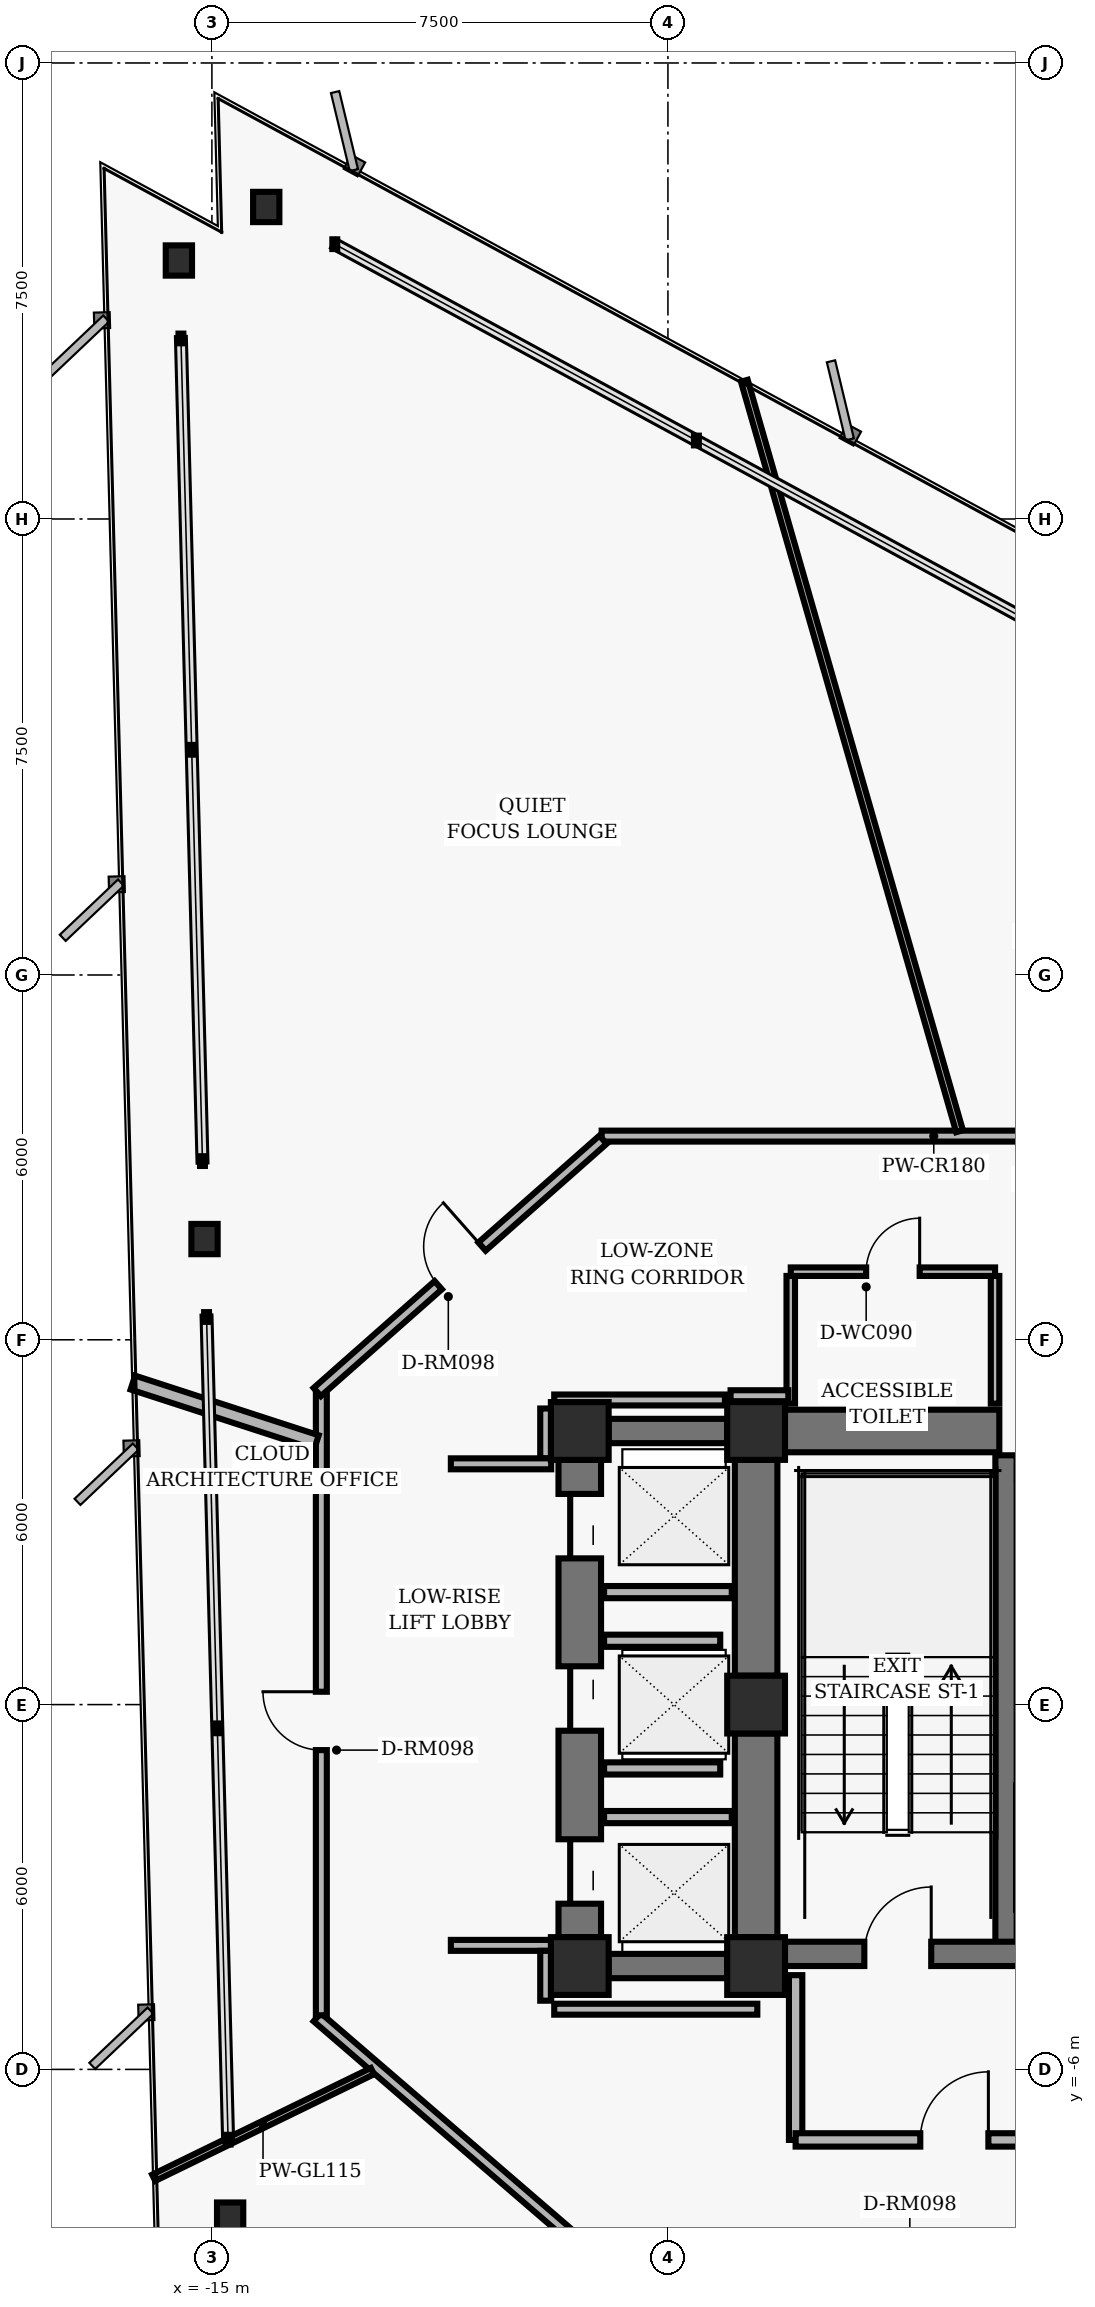
"""IFC4 building model, lengths in metres.
Left out: names, types, materials, properties, quantities, classifications, styles, units other than length and angle.
Written with IfcOpenShell. Run it as: python <this file> out.ifc"""

import sys

from ifc_helpers import new_model, si_unit, direction, frame, frame_2d, origin, origin_2d, place, context, subcontext, project, spatial, rectangle, hollow_rectangle, i_section, extrude, element, fill, save


model = new_model("IFC4")
c1 = context("Model", 3, precision=1e-05, world=origin(), true_north=direction((0.0, 1.0)))
c2 = subcontext(c1, "Body", "Model", "MODEL_VIEW")
j1 = project(units=[si_unit("LENGTHUNIT", "METRE"), si_unit("PLANEANGLEUNIT", "RADIAN")], contexts=[c1])
p1 = place(None, origin())
s1 = spatial("IfcSite", under=j1, at=p1, CompositionType="ELEMENT")
p2 = place(p1, origin())
s2 = spatial("IfcBuilding", under=s1, at=p2, CompositionType="ELEMENT")
p3 = place(p2, frame((0.0, 0.0, 22.24)))
s3 = spatial("IfcBuildingStorey", under=s2, at=p3, CompositionType="ELEMENT", Elevation=22.24)
for number, where, z_axis, x_axis in (
    (1, (-6.05, 4.5, 0.0), (0.0, 0.0, 1.0), (1.0, 0.0, 0.0)),
    (2, (-6.05, 0.0, 0.0), (0.0, 0.0, 1.0), (1.0, 0.0, 0.0)),
    (3, (-6.05, -4.3, 0.0), (0.0, 0.0, 1.0), (1.0, 0.0, 0.0)),
    (4, (-8.95, 4.5, 0.0), (0.0, 0.0, 1.0), (1.0, 0.0, 0.0)),
    (5, (-8.95, -4.3, 0.0), (0.0, 0.0, 1.0), (1.0, 0.0, 0.0)),
):
    element("IfcColumn", number, at=place(p3, frame(where, z_axis=z_axis, x_axis=x_axis)), inside=s3, PredefinedType="COLUMN", context=c2, shape_type="SweptSolid", body=[
        extrude(hollow_rectangle(XDim=0.95, YDim=0.95, WallThickness=0.06, InnerFilletRadius=0.02, OuterFilletRadius=0.04, at=origin_2d()), origin(), (0.0, 0.0, 1.0), 3.36),
    ])
p4 = place(p3, frame((-6.05, 0.475, 0.0), z_axis=(0.0, 0.0, 1.0), x_axis=(0.0, 1.0, 0.0)))
e6 = element("IfcWall", 6, at=p4, inside=s3, PredefinedType="SHEAR", context=c2, shape_type="SweptSolid", body=[
    extrude(rectangle(XDim=3.55, YDim=0.7, at=frame_2d((1.775, 0.0))), origin(), (0.0, 0.0, 1.0), 3.098),
])
p5 = place(p3, frame((-6.05, -3.825, 0.0), z_axis=(0.0, 0.0, 1.0), x_axis=(0.0, 1.0, 0.0)))
e7 = element("IfcWall", 7, at=p5, inside=s3, PredefinedType="SHEAR", context=c2, shape_type="SweptSolid", body=[
    extrude(rectangle(XDim=3.35, YDim=0.7, at=frame_2d((1.675, 0.0))), origin(), (0.0, 0.0, 1.0), 3.098),
])
p6 = place(p3, frame((-1.94, -4.1, 0.0), z_axis=(0.0, 0.0, 1.0), x_axis=(0.0, 1.0, 0.0)))
e8 = element("IfcWall", 8, at=p6, inside=s3, PredefinedType="SHEAR", context=c2, shape_type="SweptSolid", body=[
    extrude(rectangle(XDim=8.2, YDim=0.35, at=frame_2d((4.1, 0.0))), origin(), (0.0, 0.0, 1.0), 3.098),
])
p7 = place(p3, frame((-5.575, -4.1, 0.0), z_axis=(0.0, 0.0, 1.0), x_axis=(1.0, 0.0, 0.0)))
e9 = element("IfcWall", 9, at=p7, inside=s3, PredefinedType="SHEAR", context=c2, shape_type="SweptSolid", body=[
    extrude(rectangle(XDim=11.15, YDim=0.4, at=frame_2d((5.575, 0.0))), origin(), (0.0, 0.0, 1.0), 3.098),
])
p8 = place(p7, frame((1.305, 0.0, 0.0)))
e10 = element("IfcOpeningElement", 10, at=p8, cuts=e9, PredefinedType="OPENING", context=c2, shape_type="SweptSolid", body=[
    extrude(rectangle(XDim=1.1, YDim=2.04, at=frame_2d((0.55, 1.02))), frame((0.0, 0.21, 0.0), z_axis=(0.0, -1.0, 0.0), x_axis=(1.0, 0.0, 0.0)), (0.0, 0.0, 1.0), 0.42),
])
p9 = place(p7, frame((8.745, 0.0, 0.0)))
e11 = element("IfcOpeningElement", 11, at=p9, cuts=e9, PredefinedType="OPENING", context=c2, shape_type="SweptSolid", body=[
    extrude(rectangle(XDim=1.1, YDim=2.04, at=frame_2d((0.55, 1.02))), frame((0.0, 0.21, 0.0), z_axis=(0.0, -1.0, 0.0), x_axis=(1.0, 0.0, 0.0)), (0.0, 0.0, 1.0), 0.42),
])
p10 = place(p7, frame((4.045, 0.0, 0.0)))
e12 = element("IfcOpeningElement", 12, at=p10, cuts=e9, PredefinedType="OPENING", context=c2, shape_type="SweptSolid", body=[
    extrude(rectangle(XDim=1.06, YDim=2.04, at=frame_2d((0.53, 1.02))), frame((0.0, 0.21, 0.0), z_axis=(0.0, -1.0, 0.0), x_axis=(1.0, 0.0, 0.0)), (0.0, 0.0, 1.0), 0.42),
])
p11 = place(p7, frame((6.045, 0.0, 0.0)))
e13 = element("IfcOpeningElement", 13, at=p11, cuts=e9, PredefinedType="OPENING", context=c2, shape_type="SweptSolid", body=[
    extrude(rectangle(XDim=1.06, YDim=2.04, at=frame_2d((0.53, 1.02))), frame((0.0, 0.21, 0.0), z_axis=(0.0, -1.0, 0.0), x_axis=(1.0, 0.0, 0.0)), (0.0, 0.0, 1.0), 0.42),
])
p12 = place(p3, frame((-5.575, 4.5, 0.0), z_axis=(0.0, 0.0, 1.0), x_axis=(1.0, 0.0, 0.0)))
e14 = element("IfcWall", 14, at=p12, inside=s3, PredefinedType="SHEAR", context=c2, shape_type="SweptSolid", body=[
    extrude(rectangle(XDim=3.525, YDim=0.7, at=frame_2d((1.762, 0.0))), origin(), (0.0, 0.0, 1.0), 3.098),
])
p13 = place(p3, frame((-8.95, -3.825, 0.0), z_axis=(0.0, 0.0, 1.0), x_axis=(0.0, 1.0, 0.0)))
e15 = element("IfcWall", 15, at=p13, inside=s3, PredefinedType="SHEAR", context=c2, shape_type="SweptSolid", body=[
    extrude(rectangle(XDim=7.85, YDim=0.7, at=frame_2d((3.925, 0.0))), origin(), (0.0, 0.0, 1.0), 3.098),
])
p14 = place(p13, frame((0.55, 0.0, 0.0)))
e16 = element("IfcOpeningElement", 16, at=p14, cuts=e15, PredefinedType="OPENING", context=c2, shape_type="SweptSolid", body=[
    extrude(rectangle(XDim=1.06, YDim=2.04, at=frame_2d((0.53, 1.02))), frame((0.0, 0.36, 0.0), z_axis=(0.0, -1.0, 0.0), x_axis=(1.0, 0.0, 0.0)), (0.0, 0.0, 1.0), 0.72),
])
p15 = place(p13, frame((3.395, 0.0, 0.0)))
e17 = element("IfcOpeningElement", 17, at=p15, cuts=e15, PredefinedType="OPENING", context=c2, shape_type="SweptSolid", body=[
    extrude(rectangle(XDim=1.06, YDim=2.04, at=frame_2d((0.53, 1.02))), frame((0.0, 0.36, 0.0), z_axis=(0.0, -1.0, 0.0), x_axis=(1.0, 0.0, 0.0)), (0.0, 0.0, 1.0), 0.72),
])
p16 = place(p13, frame((6.23, 0.0, 0.0)))
e18 = element("IfcOpeningElement", 18, at=p16, cuts=e15, PredefinedType="OPENING", context=c2, shape_type="SweptSolid", body=[
    extrude(rectangle(XDim=1.06, YDim=2.04, at=frame_2d((0.53, 1.02))), frame((0.0, 0.36, 0.0), z_axis=(0.0, -1.0, 0.0), x_axis=(1.0, 0.0, 0.0)), (0.0, 0.0, 1.0), 0.72),
])
for number, where, z_axis, x_axis in (
    (19, (-8.475, 4.5, 0.0), (0.0, 0.0, 1.0), (1.0, 0.0, 0.0)),
    (20, (-8.475, -4.3, 0.0), (0.0, 0.0, 1.0), (1.0, 0.0, 0.0)),
):
    element("IfcWall", number, at=place(p3, frame(where, z_axis=z_axis, x_axis=x_axis)), inside=s3, PredefinedType="SHEAR", context=c2, shape_type="SweptSolid", body=[
        extrude(rectangle(XDim=1.95, YDim=0.4, at=frame_2d((0.975, 0.0))), origin(), (0.0, 0.0, 1.0), 3.098),
    ])
for number, where, z_axis, x_axis in (
    (21, (-14.106, 24.632, 0.0), (0.0, 0.0, 1.0), (1.0, 0.0, 0.0)),
    (22, (-15.543, 23.751, 0.0), (0.0, 0.0, 1.0), (1.0, 0.0, 0.0)),
    (23, (-15.121, 7.657, 0.0), (0.0, 0.0, 1.0), (1.0, 0.0, 0.0)),
    (24, (-14.7, -8.438, 0.0), (0.0, 0.0, 1.0), (1.0, 0.0, 0.0)),
):
    element("IfcColumn", number, at=place(p3, frame(where, z_axis=z_axis, x_axis=x_axis)), inside=s3, PredefinedType="COLUMN", context=c2, shape_type="SweptSolid", body=[
        extrude(i_section(OverallWidth=0.432, OverallDepth=0.498, WebThickness=0.056, FlangeThickness=0.089, FilletRadius=0.025, at=origin_2d()), origin(), (0.0, 0.0, 1.0), 3.36),
    ])
p17 = place(p3, frame((-5.4, -7.16, 0.0), z_axis=(0.0, 0.0, 1.0), x_axis=(0.0, 1.0, 0.0)))
e25 = element("IfcWall", 25, at=p17, inside=s3, PredefinedType="PARTITIONING", context=c2, shape_type="SweptSolid", body=[
    extrude(rectangle(XDim=2.71, YDim=0.22, at=frame_2d((1.355, 0.0))), origin(), (0.0, 0.0, 1.0), 3.073),
])
p18 = place(p3, frame((-5.4, -7.16, 0.0), z_axis=(0.0, 0.0, 1.0), x_axis=(1.0, 0.0, 0.0)))
e26 = element("IfcWall", 26, at=p18, inside=s3, PredefinedType="PARTITIONING", context=c2, shape_type="SweptSolid", body=[
    extrude(rectangle(XDim=5.4, YDim=0.22, at=frame_2d((2.7, 0.0))), origin(), (0.0, 0.0, 1.0), 3.073),
])
p19 = place(p18, frame((2.05, 0.0, 0.0)))
e27 = element("IfcOpeningElement", 27, at=p19, cuts=e26, PredefinedType="OPENING", context=c2, shape_type="SweptSolid", body=[
    extrude(rectangle(XDim=1.12, YDim=2.02, at=frame_2d((0.56, 1.01))), frame((0.0, 0.12, 0.0), z_axis=(0.0, -1.0, 0.0), x_axis=(1.0, 0.0, 0.0)), (0.0, 0.0, 1.0), 0.24),
])
for number, where, z_axis, x_axis in (
    (28, (-5.48, 4.95, 0.0), (0.0, 0.0, 1.0), (0.0, 1.0, 0.0)),
    (29, (-2.12, 4.95, 0.0), (0.0, 0.0, 1.0), (0.0, 1.0, 0.0)),
):
    element("IfcWall", number, at=place(p3, frame(where, z_axis=z_axis, x_axis=x_axis)), inside=s3, PredefinedType="PARTITIONING", context=c2, shape_type="SweptSolid", body=[
        extrude(rectangle(XDim=2.1, YDim=0.14, at=frame_2d((1.05, 0.0))), origin(), (0.0, 0.0, 1.0), 3.073),
    ])
p20 = place(p3, frame((-5.48, 7.12, 0.0), z_axis=(0.0, 0.0, 1.0), x_axis=(1.0, 0.0, 0.0)))
e30 = element("IfcWall", 30, at=p20, inside=s3, PredefinedType="PARTITIONING", context=c2, shape_type="SweptSolid", body=[
    extrude(rectangle(XDim=3.36, YDim=0.14, at=frame_2d((1.68, 0.0))), origin(), (0.0, 0.0, 1.0), 3.073),
])
p21 = place(p20, frame((1.24, 0.0, 0.0)))
e31 = element("IfcOpeningElement", 31, at=p21, cuts=e30, PredefinedType="OPENING", context=c2, shape_type="SweptSolid", body=[
    extrude(rectangle(XDim=0.88, YDim=2.02, at=frame_2d((0.44, 1.01))), frame((0.0, 0.08, 0.0), z_axis=(0.0, -1.0, 0.0), x_axis=(1.0, 0.0, 0.0)), (0.0, 0.0, 1.0), 0.16),
])
for number, where, z_axis, x_axis in (
    (32, (-8.55, -1.85, 0.0), (0.0, 0.0, 1.0), (1.0, 0.0, 0.0)),
    (33, (-8.55, 1.85, 0.0), (0.0, 0.0, 1.0), (1.0, 0.0, 0.0)),
):
    element("IfcWall", number, at=place(p3, frame(where, z_axis=z_axis, x_axis=x_axis)), inside=s3, PredefinedType="PARTITIONING", context=c2, shape_type="SweptSolid", body=[
        extrude(rectangle(XDim=2.1, YDim=0.2, at=frame_2d((1.05, 0.0))), origin(), (0.0, 0.0, 1.0), 3.073),
    ])
for number, where, z_axis, x_axis in (
    (34, (-8.55, -1.05, 0.0), (0.0, 0.0, 1.0), (1.0, 0.0, 0.0)),
    (35, (-8.55, 1.05, 0.0), (0.0, 0.0, 1.0), (1.0, 0.0, 0.0)),
):
    element("IfcWall", number, at=place(p3, frame(where, z_axis=z_axis, x_axis=x_axis)), inside=s3, PredefinedType="PARTITIONING", context=c2, shape_type="SweptSolid", body=[
        extrude(rectangle(XDim=1.91, YDim=0.2, at=frame_2d((0.955, 0.0))), origin(), (0.0, 0.0, 1.0), 3.073),
    ])
p22 = place(p3, frame((-8.59, 9.35, 0.0), z_axis=(0.0, 0.0, 1.0), x_axis=(1.0, 0.0, 0.0)))
e36 = element("IfcWall", 36, at=p22, inside=s3, PredefinedType="PARTITIONING", context=c2, shape_type="SweptSolid", body=[
    extrude(rectangle(XDim=17.18, YDim=0.18, at=frame_2d((8.59, 0.0))), origin(), (0.0, 0.0, 1.0), 2.587),
])
p23 = place(p22, frame((10.924, 0.0, 0.0)))
e37 = element("IfcOpeningElement", 37, at=p23, cuts=e36, PredefinedType="OPENING", context=c2, shape_type="SweptSolid", body=[
    extrude(rectangle(XDim=0.96, YDim=2.02, at=frame_2d((0.48, 1.01))), frame((0.0, 0.1, 0.0), z_axis=(0.0, -1.0, 0.0), x_axis=(1.0, 0.0, 0.0)), (0.0, 0.0, 1.0), 0.2),
])
p24 = place(p3, frame((-8.568, -9.191, 0.0), z_axis=(0.0, 0.0, 1.0), x_axis=(-0.757556899173, 0.652769135694, 0.0)))
e38 = element("IfcWall", 38, at=p24, inside=s3, PredefinedType="PARTITIONING", context=c2, shape_type="SweptSolid", body=[
    extrude(rectangle(XDim=6.204, YDim=0.18, at=frame_2d((3.102, 0.0))), origin(), (0.0, 0.0, 1.0), 3.073),
])
p25 = place(p3, frame((-13.2, -5.11, 0.0), z_axis=(0.0, 0.0, 1.0), x_axis=(0.0, 1.0, 0.0)))
e39 = element("IfcWall", 39, at=p25, inside=s3, PredefinedType="PARTITIONING", context=c2, shape_type="SweptSolid", body=[
    extrude(rectangle(XDim=10.22, YDim=0.18, at=frame_2d((5.11, 0.0))), origin(), (0.0, 0.0, 1.0), 2.587),
])
p26 = place(p25, frame((4.361, 0.0, 0.0)))
e40 = element("IfcOpeningElement", 40, at=p26, cuts=e39, PredefinedType="OPENING", context=c2, shape_type="SweptSolid", body=[
    extrude(rectangle(XDim=0.96, YDim=2.02, at=frame_2d((0.48, 1.01))), frame((0.0, 0.1, 0.0), z_axis=(0.0, -1.0, 0.0), x_axis=(1.0, 0.0, 0.0)), (0.0, 0.0, 1.0), 0.2),
])
p27 = place(p3, frame((-13.268, 5.14, 0.0), z_axis=(0.0, 0.0, 1.0), x_axis=(0.749626463267, 0.66186113768, 0.0)))
e41 = element("IfcWall", 41, at=p27, inside=s3, PredefinedType="PARTITIONING", context=c2, shape_type="SweptSolid", body=[
    extrude(rectangle(XDim=6.27, YDim=0.18, at=frame_2d((3.135, 0.0))), origin(), (0.0, 0.0, 1.0), 3.073),
])
p28 = place(p27, frame((2.655, 0.0, 0.0)))
e42 = element("IfcOpeningElement", 42, at=p28, cuts=e41, PredefinedType="OPENING", context=c2, shape_type="SweptSolid", body=[
    extrude(rectangle(XDim=0.96, YDim=2.02, at=frame_2d((0.48, 1.01))), frame((0.0, 0.1, 0.0), z_axis=(0.0, -1.0, 0.0), x_axis=(1.0, 0.0, 0.0)), (0.0, 0.0, 1.0), 0.2),
])
p29 = place(p3, frame((-9.51, 4.87, 0.0), z_axis=(0.0, 0.0, 1.0), x_axis=(0.0, -1.0, 0.0)))
e43 = element("IfcWall", 43, at=p29, inside=s3, PredefinedType="PARTITIONING", context=c2, shape_type="SweptSolid", body=[
    extrude(rectangle(XDim=0.82, YDim=0.18, at=frame_2d((0.41, 0.0))), origin(), (0.0, 0.0, 1.0), 3.073),
])
for number, where, z_axis, x_axis in (
    (44, (-9.42, 3.96, 0.0), (0.0, 0.0, 1.0), (-1.0, 0.0, 0.0)),
    (45, (-11.07, -3.96, 0.0), (0.0, 0.0, 1.0), (1.0, 0.0, 0.0)),
):
    element("IfcWall", number, at=place(p3, frame(where, z_axis=z_axis, x_axis=x_axis)), inside=s3, PredefinedType="PARTITIONING", context=c2, shape_type="SweptSolid", body=[
        extrude(rectangle(XDim=1.65, YDim=0.18, at=frame_2d((0.825, 0.0))), origin(), (0.0, 0.0, 1.0), 3.073),
    ])
p30 = place(p3, frame((-9.51, -4.05, 0.0), z_axis=(0.0, 0.0, 1.0), x_axis=(0.0, -1.0, 0.0)))
e46 = element("IfcWall", 46, at=p30, inside=s3, PredefinedType="PARTITIONING", context=c2, shape_type="SweptSolid", body=[
    extrude(rectangle(XDim=0.82, YDim=0.18, at=frame_2d((0.41, 0.0))), origin(), (0.0, 0.0, 1.0), 2.358),
])
p31 = place(p3, frame((-9.37, -5.01, 0.0), z_axis=(0.0, 0.0, 1.0), x_axis=(1.0, 0.0, 0.0)))
e47 = element("IfcWall", 47, at=p31, inside=s3, PredefinedType="PARTITIONING", context=c2, shape_type="SweptSolid", body=[
    extrude(rectangle(XDim=3.34, YDim=0.18, at=frame_2d((1.67, 0.0))), origin(), (0.0, 0.0, 1.0), 3.073),
])
p32 = place(p3, frame((-5.52, 5.08, 0.0), z_axis=(0.0, 0.0, 1.0), x_axis=(-1.0, 0.0, 0.0)))
e48 = element("IfcWall", 48, at=p32, inside=s3, PredefinedType="PARTITIONING", context=c2, shape_type="SweptSolid", body=[
    extrude(rectangle(XDim=0.95, YDim=0.18, at=frame_2d((0.475, 0.0))), origin(), (0.0, 0.0, 1.0), 3.073),
])
p33 = place(p3, frame((-6.562, 5.01, 0.0), z_axis=(0.0, 0.0, 1.0), x_axis=(-1.0, 0.0, 0.0)))
e49 = element("IfcWall", 49, at=p33, inside=s3, PredefinedType="PARTITIONING", context=c2, shape_type="SweptSolid", body=[
    extrude(rectangle(XDim=2.808, YDim=0.18, at=frame_2d((1.404, 0.0))), origin(), (0.0, 0.0, 1.0), 3.073),
])
p34 = place(p3, frame((-12.361, -6.029, 0.0), z_axis=(0.0, 0.0, 1.0), x_axis=(-0.898800692661, -0.438357519466, 0.0)))
e50 = element("IfcWall", 50, at=p34, inside=s3, PredefinedType="MOVABLE", context=c2, shape_type="SweptSolid", body=[
    extrude(rectangle(XDim=4.002, YDim=0.115, at=frame_2d((2.001, 0.0))), origin(), (0.0, 0.0, 1.0), 3.073),
])
p35 = place(p3, frame((-2.704, 9.43, 0.0), z_axis=(0.0, 0.0, 1.0), x_axis=(-0.275627518328, 0.961264516738, 0.0)))
e51 = element("IfcWall", 51, at=p35, inside=s3, PredefinedType="MOVABLE", context=c2, shape_type="SweptSolid", body=[
    extrude(rectangle(XDim=12.841, YDim=0.115, at=frame_2d((6.42, 0.0))), origin(), (0.0, 0.0, 1.0), 3.073),
])
p36 = place(p3, frame((-13.28, 4.315, 0.0), z_axis=(0.0, 0.0, 1.0), x_axis=(-0.951062315171, 0.3089991467, 0.0)))
e52 = element("IfcWall", 52, at=p36, inside=s3, PredefinedType="PARTITIONING", context=c2, shape_type="SweptSolid", body=[
    extrude(rectangle(XDim=3.176, YDim=0.24, at=frame_2d((1.588, 0.0))), origin(), (0.0, 0.0, 1.0), 3.073),
])
p37 = place(p8, origin())
e53 = element("IfcDoor", 53, at=p37, inside=s3, OperationType="SINGLE_SWING_RIGHT", PredefinedType="DOOR", context=c2, shape_type="SweptSolid", body=[
    extrude(rectangle(XDim=1.1, YDim=2.04, at=frame_2d((0.55, 1.02))), frame((0.0, 0.025, 0.0), z_axis=(0.0, -1.0, 0.0), x_axis=(1.0, 0.0, 0.0)), (0.0, 0.0, 1.0), 0.05),
])
fill(e10, e53)
p38 = place(p19, origin())
e54 = element("IfcDoor", 54, at=p38, inside=s3, OperationType="SINGLE_SWING_RIGHT", PredefinedType="DOOR", context=c2, shape_type="SweptSolid", body=[
    extrude(rectangle(XDim=1.12, YDim=2.02, at=frame_2d((0.56, 1.01))), frame((0.0, 0.025, 0.0), z_axis=(0.0, -1.0, 0.0), x_axis=(1.0, 0.0, 0.0)), (0.0, 0.0, 1.0), 0.05),
])
fill(e27, e54)
p39 = place(p21, origin())
e55 = element("IfcDoor", 55, at=p39, inside=s3, OperationType="SINGLE_SWING_RIGHT", PredefinedType="DOOR", context=c2, shape_type="SweptSolid", body=[
    extrude(rectangle(XDim=0.88, YDim=2.02, at=frame_2d((0.44, 1.01))), frame((0.0, 0.025, 0.0), z_axis=(0.0, -1.0, 0.0), x_axis=(1.0, 0.0, 0.0)), (0.0, 0.0, 1.0), 0.05),
])
fill(e31, e55)
p40 = place(p14, origin())
e56 = element("IfcDoor", 56, at=p40, inside=s3, OperationType="SLIDING_TO_LEFT", PredefinedType="DOOR", context=c2, shape_type="SweptSolid", body=[
    extrude(rectangle(XDim=1.06, YDim=2.04, at=frame_2d((0.53, 1.02))), frame((0.0, 0.025, 0.0), z_axis=(0.0, -1.0, 0.0), x_axis=(1.0, 0.0, 0.0)), (0.0, 0.0, 1.0), 0.05),
])
fill(e16, e56)
p41 = place(p15, origin())
e57 = element("IfcDoor", 57, at=p41, inside=s3, OperationType="SLIDING_TO_RIGHT", PredefinedType="DOOR", context=c2, shape_type="SweptSolid", body=[
    extrude(rectangle(XDim=1.06, YDim=2.04, at=frame_2d((0.53, 1.02))), frame((0.0, 0.025, 0.0), z_axis=(0.0, -1.0, 0.0), x_axis=(1.0, 0.0, 0.0)), (0.0, 0.0, 1.0), 0.05),
])
fill(e17, e57)
p42 = place(p16, origin())
e58 = element("IfcDoor", 58, at=p42, inside=s3, OperationType="SLIDING_TO_LEFT", PredefinedType="DOOR", context=c2, shape_type="SweptSolid", body=[
    extrude(rectangle(XDim=1.06, YDim=2.04, at=frame_2d((0.53, 1.02))), frame((0.0, 0.025, 0.0), z_axis=(0.0, -1.0, 0.0), x_axis=(1.0, 0.0, 0.0)), (0.0, 0.0, 1.0), 0.05),
])
fill(e18, e58)
p43 = place(p26, origin())
e59 = element("IfcDoor", 59, at=p43, inside=s3, OperationType="SINGLE_SWING_RIGHT", PredefinedType="DOOR", context=c2, shape_type="SweptSolid", body=[
    extrude(rectangle(XDim=0.96, YDim=2.02, at=frame_2d((0.48, 1.01))), frame((0.0, 0.025, 0.0), z_axis=(0.0, -1.0, 0.0), x_axis=(1.0, 0.0, 0.0)), (0.0, 0.0, 1.0), 0.05),
])
fill(e40, e59)
p44 = place(p28, origin())
e60 = element("IfcDoor", 60, at=p44, inside=s3, OperationType="SINGLE_SWING_RIGHT", PredefinedType="DOOR", context=c2, shape_type="SweptSolid", body=[
    extrude(rectangle(XDim=0.96, YDim=2.02, at=frame_2d((0.48, 1.01))), frame((0.0, 0.025, 0.0), z_axis=(0.0, -1.0, 0.0), x_axis=(1.0, 0.0, 0.0)), (0.0, 0.0, 1.0), 0.05),
])
fill(e42, e60)
save(model, sys.argv[1])
